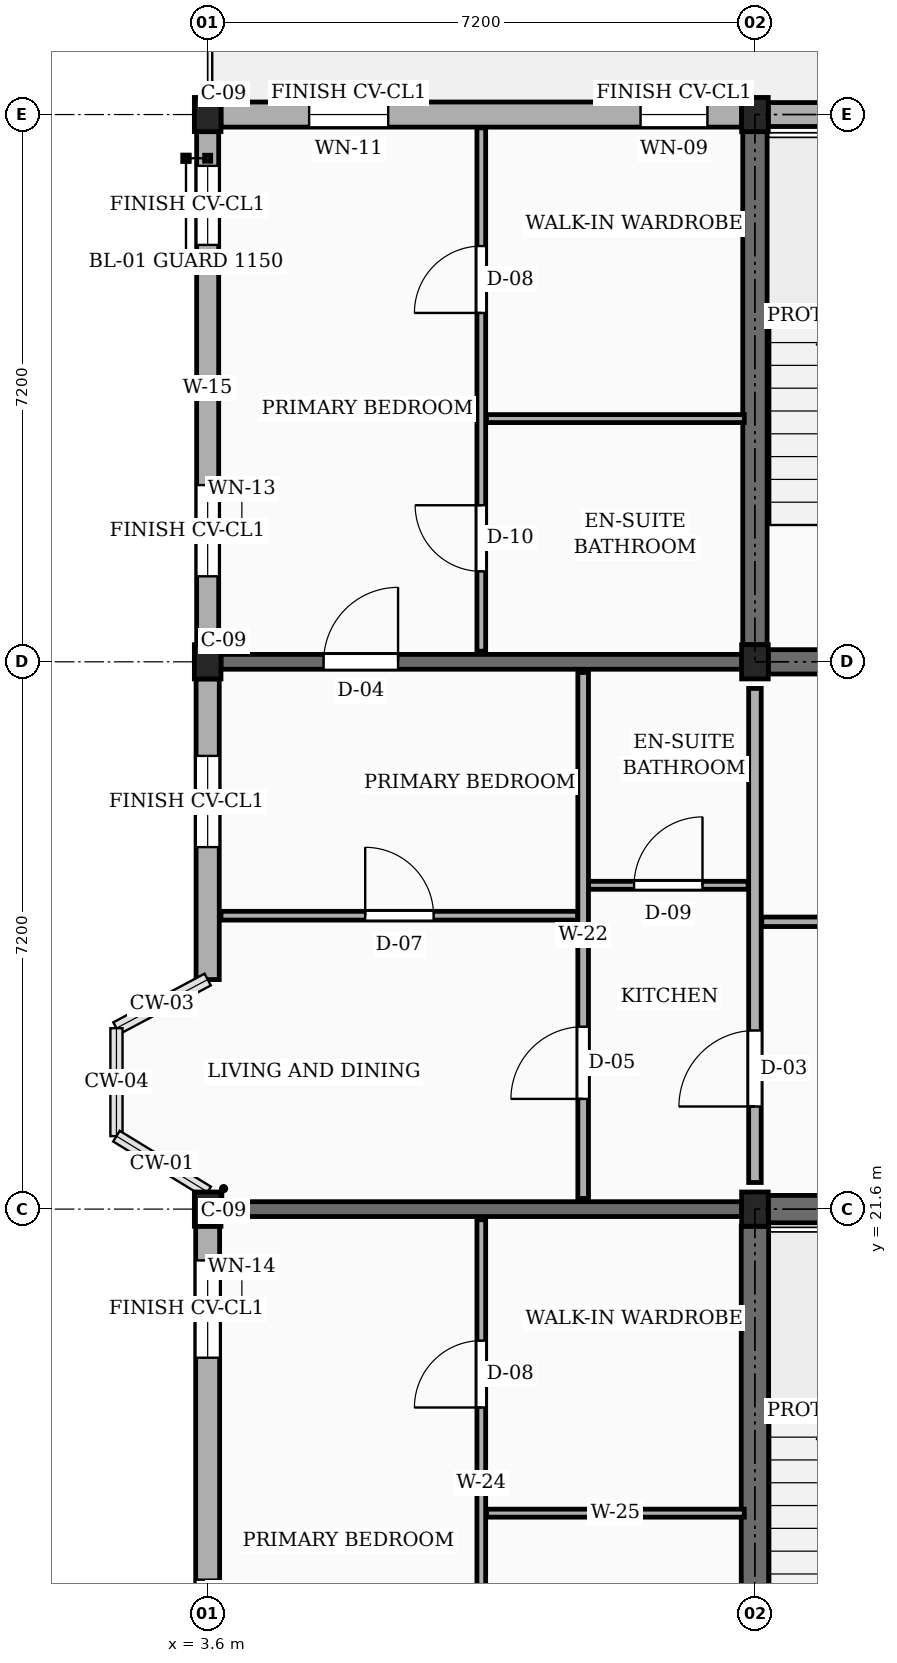
"""IFC4 building model, lengths in metres.
Left out: names, types, materials, properties, quantities, classifications, styles, units other than length and angle.
Written with IfcOpenShell. Run it as: python <this file> out.ifc"""

import sys

from ifc_helpers import new_model, si_unit, direction, frame, frame_2d, origin, origin_2d, place, context, subcontext, project, spatial, rectangle, extrude, element, fill, save


model = new_model("IFC4")
c1 = context("Model", 3, precision=1e-05, world=origin(), true_north=direction((0.0, 1.0)))
c2 = subcontext(c1, "Body", "Model", "MODEL_VIEW")
j1 = project(units=[si_unit("LENGTHUNIT", "METRE"), si_unit("PLANEANGLEUNIT", "RADIAN")], contexts=[c1])
p1 = place(None, origin())
s1 = spatial("IfcSite", under=j1, at=p1, CompositionType="ELEMENT")
p2 = place(p1, origin())
s2 = spatial("IfcBuilding", under=s1, at=p2, CompositionType="ELEMENT")
p3 = place(p2, frame((0.0, 0.0, 45.45)))
s3 = spatial("IfcBuildingStorey", under=s2, at=p3, CompositionType="ELEMENT", Elevation=45.45)
for number, where, z_axis, x_axis in (
    (1, (3.6, 21.6, 0.0), (0.0, 0.0, 1.0), (1.0, 0.0, 0.0)),
    (2, (3.6, 28.8, 0.0), (0.0, 0.0, 1.0), (1.0, 0.0, 0.0)),
    (3, (3.6, 36.0, 0.0), (0.0, 0.0, 1.0), (1.0, 0.0, 0.0)),
    (4, (10.8, 21.6, 0.0), (0.0, 0.0, 1.0), (1.0, 0.0, 0.0)),
    (5, (10.8, 28.8, 0.0), (0.0, 0.0, 1.0), (1.0, 0.0, 0.0)),
    (6, (10.8, 36.0, 0.0), (0.0, 0.0, 1.0), (1.0, 0.0, 0.0)),
):
    element("IfcColumn", number, at=place(p3, frame(where, z_axis=z_axis, x_axis=x_axis)), inside=s3, PredefinedType="COLUMN", context=c2, shape_type="SweptSolid", body=[
        extrude(rectangle(XDim=0.35, YDim=0.45, at=origin_2d()), origin(), (0.0, 0.0, 1.0), 3.15),
    ])
p4 = place(p3, frame((3.775, 21.6, 0.0), z_axis=(0.0, 0.0, 1.0), x_axis=(1.0, 0.0, 0.0)))
e7 = element("IfcWall", 7, at=p4, inside=s3, PredefinedType="SOLIDWALL", context=c2, shape_type="SweptSolid", body=[
    extrude(rectangle(XDim=6.85, YDim=0.195, at=frame_2d((3.425, 0.0))), origin(), (0.0, 0.0, 1.0), 2.17),
])
p5 = place(p3, frame((3.775, 28.8, 0.0), z_axis=(0.0, 0.0, 1.0), x_axis=(1.0, 0.0, 0.0)))
e8 = element("IfcWall", 8, at=p5, inside=s3, PredefinedType="SOLIDWALL", context=c2, shape_type="SweptSolid", body=[
    extrude(rectangle(XDim=6.85, YDim=0.195, at=frame_2d((3.425, 0.0))), origin(), (0.0, 0.0, 1.0), 2.17),
])
p6 = place(p5, frame((1.35, 0.0, 0.0)))
e9 = element("IfcOpeningElement", 9, at=p6, cuts=e8, PredefinedType="OPENING", context=c2, shape_type="SweptSolid", body=[
    extrude(rectangle(XDim=0.98, YDim=2.12, at=frame_2d((0.49, 1.06))), frame((0.0, 0.107, 0.0), z_axis=(0.0, -1.0, 0.0), x_axis=(1.0, 0.0, 0.0)), (0.0, 0.0, 1.0), 0.215),
])
p7 = place(p3, frame((17.825, 36.0, 0.0), z_axis=(0.0, 0.0, 1.0), x_axis=(-1.0, 0.0, 0.0)))
e10 = element("IfcWall", 10, at=p7, inside=s3, PredefinedType="SOLIDWALL", context=c2, shape_type="SweptSolid", body=[
    extrude(rectangle(XDim=6.85, YDim=0.315, at=frame_2d((3.425, 0.0))), origin(), (0.0, 0.0, 1.0), 2.44),
])
p8 = place(p7, frame((3.0, 0.0, 0.9)))
e11 = element("IfcOpeningElement", 11, at=p8, cuts=e10, PredefinedType="OPENING", context=c2, shape_type="SweptSolid", body=[
    extrude(rectangle(XDim=0.85, YDim=1.15, at=frame_2d((0.425, 0.575))), frame((0.0, 0.167, 0.0), z_axis=(0.0, -1.0, 0.0), x_axis=(1.0, 0.0, 0.0)), (0.0, 0.0, 1.0), 0.335),
])
p9 = place(p3, frame((10.625, 36.0, 0.0), z_axis=(0.0, 0.0, 1.0), x_axis=(-1.0, 0.0, 0.0)))
e12 = element("IfcWall", 12, at=p9, inside=s3, PredefinedType="SOLIDWALL", context=c2, shape_type="SweptSolid", body=[
    extrude(rectangle(XDim=6.85, YDim=0.33, at=frame_2d((3.425, 0.0))), origin(), (0.0, 0.0, 1.0), 2.44),
])
p10 = place(p9, frame((0.45, 0.0, 0.78)))
e13 = element("IfcOpeningElement", 13, at=p10, cuts=e12, PredefinedType="OPENING", context=c2, shape_type="SweptSolid", body=[
    extrude(rectangle(XDim=0.88, YDim=1.26, at=frame_2d((0.44, 0.63))), frame((0.0, 0.175, 0.0), z_axis=(0.0, -1.0, 0.0), x_axis=(1.0, 0.0, 0.0)), (0.0, 0.0, 1.0), 0.35),
])
p11 = place(p9, frame((4.65, 0.0, 0.78)))
e14 = element("IfcOpeningElement", 14, at=p11, cuts=e12, PredefinedType="OPENING", context=c2, shape_type="SweptSolid", body=[
    extrude(rectangle(XDim=1.04, YDim=1.26, at=frame_2d((0.52, 0.63))), frame((0.0, 0.175, 0.0), z_axis=(0.0, -1.0, 0.0), x_axis=(1.0, 0.0, 0.0)), (0.0, 0.0, 1.0), 0.35),
])
p12 = place(p3, frame((3.6, 35.775, 0.0), z_axis=(0.0, 0.0, 1.0), x_axis=(0.0, -1.0, 0.0)))
e15 = element("IfcWall", 15, at=p12, inside=s3, PredefinedType="SOLIDWALL", context=c2, shape_type="SweptSolid", body=[
    extrude(rectangle(XDim=6.75, YDim=0.29, at=frame_2d((3.375, 0.0))), origin(), (0.0, 0.0, 1.0), 2.44),
])
p13 = place(p12, frame((0.45, 0.0, 0.78)))
e16 = element("IfcOpeningElement", 16, at=p13, cuts=e15, PredefinedType="OPENING", context=c2, shape_type="SweptSolid", body=[
    extrude(rectangle(XDim=1.04, YDim=1.26, at=frame_2d((0.52, 0.63))), frame((0.0, 0.155, 0.0), z_axis=(0.0, -1.0, 0.0), x_axis=(1.0, 0.0, 0.0)), (0.0, 0.0, 1.0), 0.31),
])
p14 = place(p12, frame((4.65, 0.0, 0.78)))
e17 = element("IfcOpeningElement", 17, at=p14, cuts=e15, PredefinedType="OPENING", context=c2, shape_type="SweptSolid", body=[
    extrude(rectangle(XDim=1.2, YDim=1.26, at=frame_2d((0.6, 0.63))), frame((0.0, 0.155, 0.0), z_axis=(0.0, -1.0, 0.0), x_axis=(1.0, 0.0, 0.0)), (0.0, 0.0, 1.0), 0.31),
])
p15 = place(p3, frame((3.6, 28.575, 0.0), z_axis=(0.0, 0.0, 1.0), x_axis=(0.0, -1.0, 0.0)))
e18 = element("IfcWall", 18, at=p15, inside=s3, PredefinedType="SOLIDWALL", context=c2, shape_type="SweptSolid", body=[
    extrude(rectangle(XDim=3.955, YDim=0.305, at=frame_2d((1.978, 0.0))), origin(), (0.0, 0.0, 1.0), 2.44),
])
p16 = place(p15, frame((1.012, 0.0, 0.78)))
e19 = element("IfcOpeningElement", 19, at=p16, cuts=e18, PredefinedType="OPENING", context=c2, shape_type="SweptSolid", body=[
    extrude(rectangle(XDim=1.2, YDim=1.26, at=frame_2d((0.6, 0.63))), frame((0.0, 0.163, 0.0), z_axis=(0.0, -1.0, 0.0), x_axis=(1.0, 0.0, 0.0)), (0.0, 0.0, 1.0), 0.325),
])
p17 = place(p3, frame((3.6, 21.375, 0.0), z_axis=(0.0, 0.0, 1.0), x_axis=(0.0, -1.0, 0.0)))
e20 = element("IfcWall", 20, at=p17, inside=s3, PredefinedType="SOLIDWALL", context=c2, shape_type="SweptSolid", body=[
    extrude(rectangle(XDim=6.75, YDim=0.315, at=frame_2d((3.375, 0.0))), origin(), (0.0, 0.0, 1.0), 2.44),
])
p18 = place(p17, frame((0.45, 0.0, 0.78)))
e21 = element("IfcOpeningElement", 21, at=p18, cuts=e20, PredefinedType="OPENING", context=c2, shape_type="SweptSolid", body=[
    extrude(rectangle(XDim=1.28, YDim=1.26, at=frame_2d((0.64, 0.63))), frame((0.0, 0.167, 0.0), z_axis=(0.0, -1.0, 0.0), x_axis=(1.0, 0.0, 0.0)), (0.0, 0.0, 1.0), 0.335),
])
p19 = place(p17, frame((4.65, 0.0, 0.78)))
e22 = element("IfcOpeningElement", 22, at=p19, cuts=e20, PredefinedType="OPENING", context=c2, shape_type="SweptSolid", body=[
    extrude(rectangle(XDim=1.44, YDim=1.26, at=frame_2d((0.72, 0.63))), frame((0.0, 0.167, 0.0), z_axis=(0.0, -1.0, 0.0), x_axis=(1.0, 0.0, 0.0)), (0.0, 0.0, 1.0), 0.335),
])
p20 = place(p3, frame((10.8, 14.625, 0.0), z_axis=(0.0, 0.0, 1.0), x_axis=(0.0, 1.0, 0.0)))
e23 = element("IfcWall", 23, at=p20, inside=s3, PredefinedType="SHEAR", context=c2, shape_type="SweptSolid", body=[
    extrude(rectangle(XDim=6.75, YDim=0.36, at=frame_2d((3.375, 0.0))), origin(), (0.0, 0.0, 1.0), 2.87),
])
p21 = place(p3, frame((10.975, 21.6, 0.0), z_axis=(0.0, 0.0, 1.0), x_axis=(1.0, 0.0, 0.0)))
e24 = element("IfcWall", 24, at=p21, inside=s3, PredefinedType="SHEAR", context=c2, shape_type="SweptSolid", body=[
    extrude(rectangle(XDim=6.85, YDim=0.36, at=frame_2d((3.425, 0.0))), origin(), (0.0, 0.0, 1.0), 2.87),
])
p22 = place(p3, frame((10.8, 29.025, 0.0), z_axis=(0.0, 0.0, 1.0), x_axis=(0.0, 1.0, 0.0)))
e25 = element("IfcWall", 25, at=p22, inside=s3, PredefinedType="SHEAR", context=c2, shape_type="SweptSolid", body=[
    extrude(rectangle(XDim=6.75, YDim=0.32, at=frame_2d((3.375, 0.0))), origin(), (0.0, 0.0, 1.0), 2.87),
])
p23 = place(p3, frame((10.975, 28.8, 0.0), z_axis=(0.0, 0.0, 1.0), x_axis=(1.0, 0.0, 0.0)))
e26 = element("IfcWall", 26, at=p23, inside=s3, PredefinedType="SHEAR", context=c2, shape_type="SweptSolid", body=[
    extrude(rectangle(XDim=6.85, YDim=0.32, at=frame_2d((3.425, 0.0))), origin(), (0.0, 0.0, 1.0), 2.87),
])
p24 = place(p3, frame((10.8, 21.95, 0.0), z_axis=(0.0, 0.0, 1.0), x_axis=(0.0, 1.0, 0.0)))
e27 = element("IfcWall", 27, at=p24, inside=s3, PredefinedType="PARTITIONING", context=c2, shape_type="SweptSolid", body=[
    extrude(rectangle(XDim=6.5, YDim=0.165, at=frame_2d((3.25, 0.0))), origin(), (0.0, 0.0, 1.0), 2.305),
])
p25 = place(p24, frame((1.0, 0.0, 0.0)))
e28 = element("IfcOpeningElement", 28, at=p25, cuts=e27, PredefinedType="OPENING", context=c2, shape_type="SweptSolid", body=[
    extrude(rectangle(XDim=1.0, YDim=2.15, at=frame_2d((0.5, 1.075))), frame((0.0, 0.093, 0.0), z_axis=(0.0, -1.0, 0.0), x_axis=(1.0, 0.0, 0.0)), (0.0, 0.0, 1.0), 0.185),
])
p26 = place(p3, frame((7.2, 14.54, 0.0), z_axis=(0.0, 0.0, 1.0), x_axis=(0.0, 1.0, 0.0)))
e29 = element("IfcWall", 29, at=p26, inside=s3, PredefinedType="PARTITIONING", context=c2, shape_type="SweptSolid", body=[
    extrude(rectangle(XDim=6.92, YDim=0.115, at=frame_2d((3.46, 0.0))), origin(), (0.0, 0.0, 1.0), 2.305),
])
p27 = place(p26, frame((1.05, 0.0, 0.0)))
e30 = element("IfcOpeningElement", 30, at=p27, cuts=e29, PredefinedType="OPENING", context=c2, shape_type="SweptSolid", body=[
    extrude(rectangle(XDim=0.87, YDim=2.05, at=frame_2d((0.435, 1.025))), frame((0.0, 0.067, 0.0), z_axis=(0.0, -1.0, 0.0), x_axis=(1.0, 0.0, 0.0)), (0.0, 0.0, 1.0), 0.135),
])
p28 = place(p26, frame((4.45, 0.0, 0.0)))
e31 = element("IfcOpeningElement", 31, at=p28, cuts=e29, PredefinedType="OPENING", context=c2, shape_type="SweptSolid", body=[
    extrude(rectangle(XDim=0.88, YDim=2.08, at=frame_2d((0.44, 1.04))), frame((0.0, 0.067, 0.0), z_axis=(0.0, -1.0, 0.0), x_axis=(1.0, 0.0, 0.0)), (0.0, 0.0, 1.0), 0.135),
])
p29 = place(p3, frame((7.27, 17.6, 0.0), z_axis=(0.0, 0.0, 1.0), x_axis=(1.0, 0.0, 0.0)))
e32 = element("IfcWall", 32, at=p29, inside=s3, PredefinedType="PARTITIONING", context=c2, shape_type="SweptSolid", body=[
    extrude(rectangle(XDim=3.39, YDim=0.105, at=frame_2d((1.695, 0.0))), origin(), (0.0, 0.0, 1.0), 2.305),
])
p30 = place(p3, frame((10.89, 25.38, 0.0), z_axis=(0.0, 0.0, 1.0), x_axis=(1.0, 0.0, 0.0)))
e33 = element("IfcWall", 33, at=p30, inside=s3, PredefinedType="PARTITIONING", context=c2, shape_type="SweptSolid", body=[
    extrude(rectangle(XDim=7.02, YDim=0.125, at=frame_2d((3.51, 0.0))), origin(), (0.0, 0.0, 1.0), 2.305),
])
p31 = place(p30, frame((2.85, 0.0, 0.0)))
e34 = element("IfcOpeningElement", 34, at=p31, cuts=e33, PredefinedType="OPENING", context=c2, shape_type="SweptSolid", body=[
    extrude(rectangle(XDim=1.02, YDim=2.15, at=frame_2d((0.51, 1.075))), frame((0.0, 0.073, 0.0), z_axis=(0.0, -1.0, 0.0), x_axis=(1.0, 0.0, 0.0)), (0.0, 0.0, 1.0), 0.145),
])
p32 = place(p3, frame((3.775, 25.46, 0.0), z_axis=(0.0, 0.0, 1.0), x_axis=(1.0, 0.0, 0.0)))
e35 = element("IfcWall", 35, at=p32, inside=s3, PredefinedType="PARTITIONING", context=c2, shape_type="SweptSolid", body=[
    extrude(rectangle(XDim=4.695, YDim=0.115, at=frame_2d((2.348, 0.0))), origin(), (0.0, 0.0, 1.0), 2.305),
])
p33 = place(p32, frame((1.897, 0.0, 0.0)))
e36 = element("IfcOpeningElement", 36, at=p33, cuts=e35, PredefinedType="OPENING", context=c2, shape_type="SweptSolid", body=[
    extrude(rectangle(XDim=0.9, YDim=2.1, at=frame_2d((0.45, 1.05))), frame((0.0, 0.067, 0.0), z_axis=(0.0, -1.0, 0.0), x_axis=(1.0, 0.0, 0.0)), (0.0, 0.0, 1.0), 0.135),
])
p34 = place(p3, frame((8.61, 25.86, 0.0), z_axis=(0.0, 0.0, 1.0), x_axis=(1.0, 0.0, 0.0)))
e37 = element("IfcWall", 37, at=p34, inside=s3, PredefinedType="PARTITIONING", context=c2, shape_type="SweptSolid", body=[
    extrude(rectangle(XDim=2.1, YDim=0.105, at=frame_2d((1.05, 0.0))), origin(), (0.0, 0.0, 1.0), 2.305),
])
p35 = place(p34, frame((0.6, 0.0, 0.0)))
e38 = element("IfcOpeningElement", 38, at=p35, cuts=e37, PredefinedType="OPENING", context=c2, shape_type="SweptSolid", body=[
    extrude(rectangle(XDim=0.9, YDim=2.05, at=frame_2d((0.45, 1.025))), frame((0.0, 0.062, 0.0), z_axis=(0.0, -1.0, 0.0), x_axis=(1.0, 0.0, 0.0)), (0.0, 0.0, 1.0), 0.125),
])
p36 = place(p3, frame((8.54, 21.74, 0.0), z_axis=(0.0, 0.0, 1.0), x_axis=(0.0, 1.0, 0.0)))
e39 = element("IfcWall", 39, at=p36, inside=s3, PredefinedType="PARTITIONING", context=c2, shape_type="SweptSolid", body=[
    extrude(rectangle(XDim=6.92, YDim=0.14, at=frame_2d((3.46, 0.0))), origin(), (0.0, 0.0, 1.0), 2.305),
])
p37 = place(p36, frame((1.31, 0.0, 0.0)))
e40 = element("IfcOpeningElement", 40, at=p37, cuts=e39, PredefinedType="OPENING", context=c2, shape_type="SweptSolid", body=[
    extrude(rectangle(XDim=0.95, YDim=2.1, at=frame_2d((0.475, 1.05))), frame((0.0, 0.08, 0.0), z_axis=(0.0, -1.0, 0.0), x_axis=(1.0, 0.0, 0.0)), (0.0, 0.0, 1.0), 0.16),
])
p38 = place(p3, frame((7.2, 28.94, 0.0), z_axis=(0.0, 0.0, 1.0), x_axis=(0.0, 1.0, 0.0)))
e41 = element("IfcWall", 41, at=p38, inside=s3, PredefinedType="PARTITIONING", context=c2, shape_type="SweptSolid", body=[
    extrude(rectangle(XDim=6.885, YDim=0.115, at=frame_2d((3.442, 0.0))), origin(), (0.0, 0.0, 1.0), 2.305),
])
p39 = place(p38, frame((1.05, 0.0, 0.0)))
e42 = element("IfcOpeningElement", 42, at=p39, cuts=e41, PredefinedType="OPENING", context=c2, shape_type="SweptSolid", body=[
    extrude(rectangle(XDim=0.87, YDim=2.05, at=frame_2d((0.435, 1.025))), frame((0.0, 0.067, 0.0), z_axis=(0.0, -1.0, 0.0), x_axis=(1.0, 0.0, 0.0)), (0.0, 0.0, 1.0), 0.135),
])
p40 = place(p38, frame((4.45, 0.0, 0.0)))
e43 = element("IfcOpeningElement", 43, at=p40, cuts=e41, PredefinedType="OPENING", context=c2, shape_type="SweptSolid", body=[
    extrude(rectangle(XDim=0.88, YDim=2.08, at=frame_2d((0.44, 1.04))), frame((0.0, 0.067, 0.0), z_axis=(0.0, -1.0, 0.0), x_axis=(1.0, 0.0, 0.0)), (0.0, 0.0, 1.0), 0.135),
])
p41 = place(p3, frame((7.27, 32.0, 0.0), z_axis=(0.0, 0.0, 1.0), x_axis=(1.0, 0.0, 0.0)))
e44 = element("IfcWall", 44, at=p41, inside=s3, PredefinedType="PARTITIONING", context=c2, shape_type="SweptSolid", body=[
    extrude(rectangle(XDim=3.39, YDim=0.105, at=frame_2d((1.695, 0.0))), origin(), (0.0, 0.0, 1.0), 2.305),
])
p42 = place(p10, origin())
e45 = element("IfcWindow", 45, at=p42, inside=s3, PartitioningType="SINGLE_PANEL", PredefinedType="WINDOW", context=c2, shape_type="SweptSolid", body=[
    extrude(rectangle(XDim=0.88, YDim=1.26, at=frame_2d((0.44, 0.63))), frame((0.0, 0.03, 0.0), z_axis=(0.0, -1.0, 0.0), x_axis=(1.0, 0.0, 0.0)), (0.0, 0.0, 1.0), 0.06),
])
fill(e13, e45)
p43 = place(p11, origin())
e46 = element("IfcWindow", 46, at=p43, inside=s3, PartitioningType="SINGLE_PANEL", PredefinedType="WINDOW", context=c2, shape_type="SweptSolid", body=[
    extrude(rectangle(XDim=1.04, YDim=1.26, at=frame_2d((0.52, 0.63))), frame((0.0, 0.03, 0.0), z_axis=(0.0, -1.0, 0.0), x_axis=(1.0, 0.0, 0.0)), (0.0, 0.0, 1.0), 0.06),
])
fill(e14, e46)
p44 = place(p13, origin())
e47 = element("IfcWindow", 47, at=p44, inside=s3, PartitioningType="SINGLE_PANEL", PredefinedType="WINDOW", context=c2, shape_type="SweptSolid", body=[
    extrude(rectangle(XDim=1.04, YDim=1.26, at=frame_2d((0.52, 0.63))), frame((0.0, 0.03, 0.0), z_axis=(0.0, -1.0, 0.0), x_axis=(1.0, 0.0, 0.0)), (0.0, 0.0, 1.0), 0.06),
])
fill(e16, e47)
p45 = place(p14, origin())
e48 = element("IfcWindow", 48, at=p45, inside=s3, PartitioningType="SINGLE_PANEL", PredefinedType="WINDOW", context=c2, shape_type="SweptSolid", body=[
    extrude(rectangle(XDim=1.2, YDim=1.26, at=frame_2d((0.6, 0.63))), frame((0.0, 0.03, 0.0), z_axis=(0.0, -1.0, 0.0), x_axis=(1.0, 0.0, 0.0)), (0.0, 0.0, 1.0), 0.06),
])
fill(e17, e48)
p46 = place(p16, origin())
e49 = element("IfcWindow", 49, at=p46, inside=s3, PartitioningType="SINGLE_PANEL", PredefinedType="WINDOW", context=c2, shape_type="SweptSolid", body=[
    extrude(rectangle(XDim=1.2, YDim=1.26, at=frame_2d((0.6, 0.63))), frame((0.0, 0.03, 0.0), z_axis=(0.0, -1.0, 0.0), x_axis=(1.0, 0.0, 0.0)), (0.0, 0.0, 1.0), 0.06),
])
fill(e19, e49)
p47 = place(p18, origin())
e50 = element("IfcWindow", 50, at=p47, inside=s3, PartitioningType="SINGLE_PANEL", PredefinedType="WINDOW", context=c2, shape_type="SweptSolid", body=[
    extrude(rectangle(XDim=1.28, YDim=1.26, at=frame_2d((0.64, 0.63))), frame((0.0, 0.03, 0.0), z_axis=(0.0, -1.0, 0.0), x_axis=(1.0, 0.0, 0.0)), (0.0, 0.0, 1.0), 0.06),
])
fill(e21, e50)
p48 = place(p19, origin())
e51 = element("IfcWindow", 51, at=p48, inside=s3, PartitioningType="SINGLE_PANEL", PredefinedType="WINDOW", context=c2, shape_type="SweptSolid", body=[
    extrude(rectangle(XDim=1.44, YDim=1.26, at=frame_2d((0.72, 0.63))), frame((0.0, 0.03, 0.0), z_axis=(0.0, -1.0, 0.0), x_axis=(1.0, 0.0, 0.0)), (0.0, 0.0, 1.0), 0.06),
])
fill(e22, e51)
p49 = place(p25, origin())
e52 = element("IfcDoor", 52, at=p49, inside=s3, OperationType="SINGLE_SWING_LEFT", PredefinedType="DOOR", context=c2, shape_type="SweptSolid", body=[
    extrude(rectangle(XDim=1.0, YDim=2.15, at=frame_2d((0.5, 1.075))), frame((0.0, 0.025, 0.0), z_axis=(0.0, -1.0, 0.0), x_axis=(1.0, 0.0, 0.0)), (0.0, 0.0, 1.0), 0.05),
])
fill(e28, e52)
p50 = place(p28, origin())
e53 = element("IfcDoor", 53, at=p50, inside=s3, OperationType="SINGLE_SWING_LEFT", PredefinedType="DOOR", context=c2, shape_type="SweptSolid", body=[
    extrude(rectangle(XDim=0.88, YDim=2.08, at=frame_2d((0.44, 1.04))), frame((0.0, 0.025, 0.0), z_axis=(0.0, -1.0, 0.0), x_axis=(1.0, 0.0, 0.0)), (0.0, 0.0, 1.0), 0.05),
])
fill(e31, e53)
p51 = place(p33, origin())
e54 = element("IfcDoor", 54, at=p51, inside=s3, OperationType="SINGLE_SWING_LEFT", PredefinedType="DOOR", context=c2, shape_type="SweptSolid", body=[
    extrude(rectangle(XDim=0.9, YDim=2.1, at=frame_2d((0.45, 1.05))), frame((0.0, 0.025, 0.0), z_axis=(0.0, -1.0, 0.0), x_axis=(1.0, 0.0, 0.0)), (0.0, 0.0, 1.0), 0.05),
])
fill(e36, e54)
p52 = place(p35, origin())
e55 = element("IfcDoor", 55, at=p52, inside=s3, OperationType="SINGLE_SWING_RIGHT", PredefinedType="DOOR", context=c2, shape_type="SweptSolid", body=[
    extrude(rectangle(XDim=0.9, YDim=2.05, at=frame_2d((0.45, 1.025))), frame((0.0, 0.025, 0.0), z_axis=(0.0, -1.0, 0.0), x_axis=(1.0, 0.0, 0.0)), (0.0, 0.0, 1.0), 0.05),
])
fill(e38, e55)
p53 = place(p37, origin())
e56 = element("IfcDoor", 56, at=p53, inside=s3, OperationType="SINGLE_SWING_LEFT", PredefinedType="DOOR", context=c2, shape_type="SweptSolid", body=[
    extrude(rectangle(XDim=0.95, YDim=2.1, at=frame_2d((0.475, 1.05))), frame((0.0, 0.025, 0.0), z_axis=(0.0, -1.0, 0.0), x_axis=(1.0, 0.0, 0.0)), (0.0, 0.0, 1.0), 0.05),
])
fill(e40, e56)
p54 = place(p39, origin())
e57 = element("IfcDoor", 57, at=p54, inside=s3, OperationType="SINGLE_SWING_RIGHT", PredefinedType="DOOR", context=c2, shape_type="SweptSolid", body=[
    extrude(rectangle(XDim=0.87, YDim=2.05, at=frame_2d((0.435, 1.025))), frame((0.0, 0.025, 0.0), z_axis=(0.0, -1.0, 0.0), x_axis=(1.0, 0.0, 0.0)), (0.0, 0.0, 1.0), 0.05),
])
fill(e42, e57)
p55 = place(p40, origin())
e58 = element("IfcDoor", 58, at=p55, inside=s3, OperationType="SINGLE_SWING_LEFT", PredefinedType="DOOR", context=c2, shape_type="SweptSolid", body=[
    extrude(rectangle(XDim=0.88, YDim=2.08, at=frame_2d((0.44, 1.04))), frame((0.0, 0.025, 0.0), z_axis=(0.0, -1.0, 0.0), x_axis=(1.0, 0.0, 0.0)), (0.0, 0.0, 1.0), 0.05),
])
fill(e43, e58)
p56 = place(p6, origin())
e59 = element("IfcDoor", 59, at=p56, inside=s3, OperationType="SINGLE_SWING_RIGHT", PredefinedType="DOOR", context=c2, shape_type="SweptSolid", body=[
    extrude(rectangle(XDim=0.98, YDim=2.12, at=frame_2d((0.49, 1.06))), frame((0.0, 0.025, 0.0), z_axis=(0.0, -1.0, 0.0), x_axis=(1.0, 0.0, 0.0)), (0.0, 0.0, 1.0), 0.05),
])
fill(e9, e59)
save(model, sys.argv[1])
